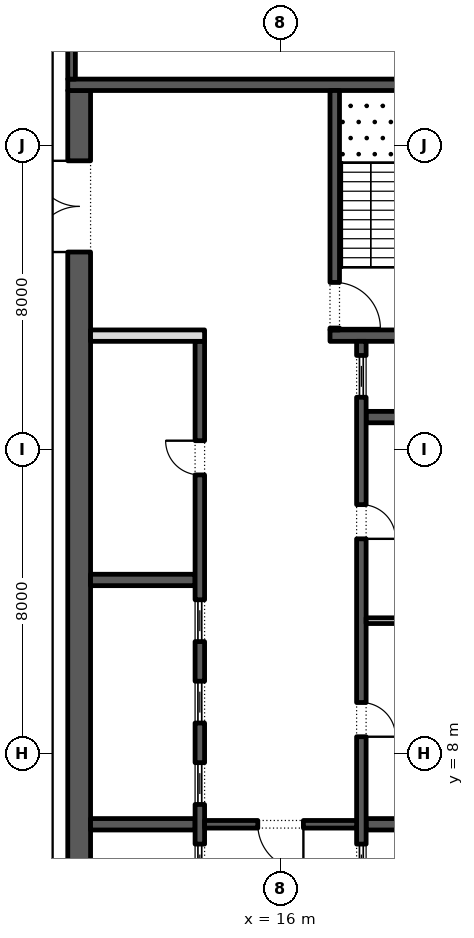
"""IFC4 building model, lengths in metres.
Left out: names, types, materials, properties, quantities, classifications, styles, units other than length and angle.
Written with IfcOpenShell. Run it as: python <this file> out.ifc"""

import sys

from ifc_helpers import new_model, si_unit, direction, frame, frame_2d, origin, place, context, subcontext, project, spatial, rectangle, extrude, element, fill, save


model = new_model("IFC4")
c1 = context("Model", 3, precision=1e-05, world=origin(), true_north=direction((0.0, 1.0)))
c2 = subcontext(c1, "Body", "Model", "MODEL_VIEW")
j1 = project(units=[si_unit("LENGTHUNIT", "METRE"), si_unit("PLANEANGLEUNIT", "RADIAN")], contexts=[c1])
p1 = place(None, origin())
s1 = spatial("IfcSite", under=j1, at=p1, CompositionType="ELEMENT")
p2 = place(p1, origin())
s2 = spatial("IfcBuilding", under=s1, at=p2, CompositionType="ELEMENT")
p3 = place(p2, frame((0.0, 0.0, 276.6)))
s3 = spatial("IfcBuildingStorey", under=s2, at=p3, CompositionType="ELEMENT", Elevation=276.6)
p4 = place(p3, frame((10.7, -2.45, 0.0), z_axis=(0.0, 0.0, 1.0), x_axis=(0.0, 1.0, 0.0)))
e1 = element("IfcWall", 1, at=p4, inside=s3, PredefinedType="SHEAR", context=c2, shape_type="SweptSolid", body=[
    extrude(rectangle(XDim=27.9, YDim=0.6, at=frame_2d((13.95, 0.0))), origin(), (0.0, 0.0, 1.0), 4.0),
])
p5 = place(p4, frame((23.65, 0.0, 0.0)))
e2 = element("IfcOpeningElement", 2, at=p5, cuts=e1, PredefinedType="OPENING", context=c2, shape_type="SweptSolid", body=[
    extrude(rectangle(XDim=2.4, YDim=2.1, at=frame_2d((1.2, 1.05))), frame((0.0, 0.31, 0.0), z_axis=(0.0, -1.0, 0.0), x_axis=(1.0, 0.0, 0.0)), (0.0, 0.0, 1.0), 0.62),
])
p6 = place(p4, frame((0.788, 0.0, 0.0)))
e3 = element("IfcOpeningElement", 3, at=p6, cuts=e1, PredefinedType="OPENING", context=c2, shape_type="SweptSolid", body=[
    extrude(rectangle(XDim=0.9, YDim=2.1, at=frame_2d((0.45, 1.05))), frame((0.0, 0.31, 0.0), z_axis=(0.0, -1.0, 0.0), x_axis=(1.0, 0.0, 0.0)), (0.0, 0.0, 1.0), 0.62),
])
p7 = place(p4, frame((3.962, 0.0, 0.0)))
e4 = element("IfcOpeningElement", 4, at=p7, cuts=e1, PredefinedType="OPENING", context=c2, shape_type="SweptSolid", body=[
    extrude(rectangle(XDim=1.0, YDim=2.1, at=frame_2d((0.5, 1.05))), frame((0.0, 0.31, 0.0), z_axis=(0.0, -1.0, 0.0), x_axis=(1.0, 0.0, 0.0)), (0.0, 0.0, 1.0), 0.62),
])
p8 = place(p3, frame((10.4, 25.6, 0.0), z_axis=(0.0, 0.0, 1.0), x_axis=(1.0, 0.0, 0.0)))
e5 = element("IfcWall", 5, at=p8, inside=s3, PredefinedType="SHEAR", context=c2, shape_type="SweptSolid", body=[
    extrude(rectangle(XDim=11.2, YDim=0.3, at=frame_2d((5.6, 0.0))), origin(), (0.0, 0.0, 1.0), 4.0),
])
p9 = place(p3, frame((17.3, 19.0, 0.0), z_axis=(0.0, 0.0, 1.0), x_axis=(1.0, 0.0, 0.0)))
e6 = element("IfcWall", 6, at=p9, inside=s3, PredefinedType="SHEAR", context=c2, shape_type="SweptSolid", body=[
    extrude(rectangle(XDim=3.7, YDim=0.3, at=frame_2d((1.85, 0.0))), origin(), (0.0, 0.0, 1.0), 4.0),
])
p10 = place(p3, frame((17.425, 19.15, 0.0), z_axis=(0.0, 0.0, 1.0), x_axis=(0.0, 1.0, 0.0)))
e7 = element("IfcWall", 7, at=p10, inside=s3, PredefinedType="SHEAR", context=c2, shape_type="SweptSolid", body=[
    extrude(rectangle(XDim=6.3, YDim=0.25, at=frame_2d((3.15, 0.0))), origin(), (0.0, 0.0, 1.0), 4.0),
])
p11 = place(p10, frame((0.05, 0.0, 0.0)))
e8 = element("IfcOpeningElement", 8, at=p11, cuts=e7, PredefinedType="OPENING", context=c2, shape_type="SweptSolid", body=[
    extrude(rectangle(XDim=1.2, YDim=2.1, at=frame_2d((0.6, 1.05))), frame((0.0, 0.135, 0.0), z_axis=(0.0, -1.0, 0.0), x_axis=(1.0, 0.0, 0.0)), (0.0, 0.0, 1.0), 0.27),
])
for number, where, z_axis, x_axis in (
    (9, (18.25, 6.143, 0.0), (0.0, 0.0, 1.0), (1.0, 0.0, 0.0)),
    (10, (18.25, 16.857, 0.0), (0.0, 0.0, 1.0), (1.0, 0.0, 0.0)),
):
    element("IfcWall", number, at=place(p3, frame(where, z_axis=z_axis, x_axis=x_axis)), inside=s3, PredefinedType="SHEAR", context=c2, shape_type="SweptSolid", body=[
        extrude(rectangle(XDim=2.75, YDim=0.3, at=frame_2d((1.375, 0.0))), origin(), (0.0, 0.0, 1.0), 4.0),
    ])
p12 = place(p3, frame((18.125, 4.15, 0.0), z_axis=(0.0, 0.0, 1.0), x_axis=(0.0, 1.0, 0.0)))
e11 = element("IfcWall", 11, at=p12, inside=s3, PredefinedType="SHEAR", context=c2, shape_type="SweptSolid", body=[
    extrude(rectangle(XDim=14.7, YDim=0.25, at=frame_2d((7.35, 0.0))), origin(), (0.0, 0.0, 1.0), 4.0),
])
p13 = place(p12, frame((4.296, 0.0, 0.0)))
e12 = element("IfcOpeningElement", 12, at=p13, cuts=e11, PredefinedType="OPENING", context=c2, shape_type="SweptSolid", body=[
    extrude(rectangle(XDim=0.9, YDim=2.1, at=frame_2d((0.45, 1.05))), frame((0.0, 0.135, 0.0), z_axis=(0.0, -1.0, 0.0), x_axis=(1.0, 0.0, 0.0)), (0.0, 0.0, 1.0), 0.27),
])
p14 = place(p12, frame((9.504, 0.0, 0.0)))
e13 = element("IfcOpeningElement", 13, at=p14, cuts=e11, PredefinedType="OPENING", context=c2, shape_type="SweptSolid", body=[
    extrude(rectangle(XDim=0.9, YDim=2.1, at=frame_2d((0.45, 1.05))), frame((0.0, 0.135, 0.0), z_axis=(0.0, -1.0, 0.0), x_axis=(1.0, 0.0, 0.0)), (0.0, 0.0, 1.0), 0.27),
])
p15 = place(p12, frame((0.371, 0.0, 0.0)))
e14 = element("IfcOpeningElement", 14, at=p15, cuts=e11, PredefinedType="OPENING", context=c2, shape_type="SweptSolid", body=[
    extrude(rectangle(XDim=1.1, YDim=2.1, at=frame_2d((0.55, 1.05))), frame((0.0, 0.135, 0.0), z_axis=(0.0, -1.0, 0.0), x_axis=(1.0, 0.0, 0.0)), (0.0, 0.0, 1.0), 0.27),
])
p16 = place(p12, frame((13.229, 0.0, 0.0)))
e15 = element("IfcOpeningElement", 15, at=p16, cuts=e11, PredefinedType="OPENING", context=c2, shape_type="SweptSolid", body=[
    extrude(rectangle(XDim=1.1, YDim=2.1, at=frame_2d((0.55, 1.05))), frame((0.0, 0.135, 0.0), z_axis=(0.0, -1.0, 0.0), x_axis=(1.0, 0.0, 0.0)), (0.0, 0.0, 1.0), 0.27),
])
p17 = place(p3, frame((18.25, 11.5, 0.0), z_axis=(0.0, 0.0, 1.0), x_axis=(1.0, 0.0, 0.0)))
e16 = element("IfcWall", 16, at=p17, inside=s3, PredefinedType="PARTITIONING", context=c2, shape_type="SweptSolid", body=[
    extrude(rectangle(XDim=2.75, YDim=0.15, at=frame_2d((1.375, 0.0))), origin(), (0.0, 0.0, 1.0), 4.0),
])
for number, where, z_axis, x_axis in (
    (17, (11.0, 6.143, 0.0), (0.0, 0.0, 1.0), (1.0, 0.0, 0.0)),
    (18, (11.0, 12.571, 0.0), (0.0, 0.0, 1.0), (1.0, 0.0, 0.0)),
):
    element("IfcWall", number, at=place(p3, frame(where, z_axis=z_axis, x_axis=x_axis)), inside=s3, PredefinedType="SHEAR", context=c2, shape_type="SweptSolid", body=[
        extrude(rectangle(XDim=2.75, YDim=0.3, at=frame_2d((1.375, 0.0))), origin(), (0.0, 0.0, 1.0), 4.0),
    ])
p18 = place(p3, frame((13.875, -2.45, 0.0), z_axis=(0.0, 0.0, 1.0), x_axis=(0.0, 1.0, 0.0)))
e19 = element("IfcWall", 19, at=p18, inside=s3, PredefinedType="SHEAR", context=c2, shape_type="SweptSolid", body=[
    extrude(rectangle(XDim=21.3, YDim=0.25, at=frame_2d((10.65, 0.0))), origin(), (0.0, 0.0, 1.0), 4.0),
])
p19 = place(p18, frame((17.786, 0.0, 0.0)))
e20 = element("IfcOpeningElement", 20, at=p19, cuts=e19, PredefinedType="OPENING", context=c2, shape_type="SweptSolid", body=[
    extrude(rectangle(XDim=0.9, YDim=2.1, at=frame_2d((0.45, 1.05))), frame((0.0, 0.135, 0.0), z_axis=(0.0, -1.0, 0.0), x_axis=(1.0, 0.0, 0.0)), (0.0, 0.0, 1.0), 0.27),
])
p20 = place(p18, frame((6.971, 0.0, 0.0)))
e21 = element("IfcOpeningElement", 21, at=p20, cuts=e19, PredefinedType="OPENING", context=c2, shape_type="SweptSolid", body=[
    extrude(rectangle(XDim=1.1, YDim=2.1, at=frame_2d((0.55, 1.05))), frame((0.0, 0.135, 0.0), z_axis=(0.0, -1.0, 0.0), x_axis=(1.0, 0.0, 0.0)), (0.0, 0.0, 1.0), 0.27),
])
p21 = place(p18, frame((9.114, 0.0, 0.0)))
e22 = element("IfcOpeningElement", 22, at=p21, cuts=e19, PredefinedType="OPENING", context=c2, shape_type="SweptSolid", body=[
    extrude(rectangle(XDim=1.1, YDim=2.1, at=frame_2d((0.55, 1.05))), frame((0.0, 0.135, 0.0), z_axis=(0.0, -1.0, 0.0), x_axis=(1.0, 0.0, 0.0)), (0.0, 0.0, 1.0), 0.27),
])
p22 = place(p18, frame((11.257, 0.0, 0.0)))
e23 = element("IfcOpeningElement", 23, at=p22, cuts=e19, PredefinedType="OPENING", context=c2, shape_type="SweptSolid", body=[
    extrude(rectangle(XDim=1.1, YDim=2.1, at=frame_2d((0.55, 1.05))), frame((0.0, 0.135, 0.0), z_axis=(0.0, -1.0, 0.0), x_axis=(1.0, 0.0, 0.0)), (0.0, 0.0, 1.0), 0.27),
])
p23 = place(p18, frame((13.4, 0.0, 0.0)))
e24 = element("IfcOpeningElement", 24, at=p23, cuts=e19, PredefinedType="OPENING", context=c2, shape_type="SweptSolid", body=[
    extrude(rectangle(XDim=1.1, YDim=2.1, at=frame_2d((0.55, 1.05))), frame((0.0, 0.135, 0.0), z_axis=(0.0, -1.0, 0.0), x_axis=(1.0, 0.0, 0.0)), (0.0, 0.0, 1.0), 0.27),
])
p24 = place(p3, frame((11.0, 19.0, 0.0), z_axis=(0.0, 0.0, 1.0), x_axis=(1.0, 0.0, 0.0)))
e25 = element("IfcWall", 25, at=p24, inside=s3, PredefinedType="PARTITIONING", context=c2, shape_type="SweptSolid", body=[
    extrude(rectangle(XDim=3.0, YDim=0.3, at=frame_2d((1.5, 0.0))), origin(), (0.0, 0.0, 1.0), 4.0),
])
p25 = place(p3, frame((14.0, 6.143, 0.0), z_axis=(0.0, 0.0, 1.0), x_axis=(1.0, 0.0, 0.0)))
e26 = element("IfcWall", 26, at=p25, inside=s3, PredefinedType="SHEAR", context=c2, shape_type="SweptSolid", body=[
    extrude(rectangle(XDim=4.0, YDim=0.2, at=frame_2d((2.0, 0.0))), origin(), (0.0, 0.0, 1.0), 4.0),
])
p26 = place(p25, frame((1.4, 0.0, 0.0)))
e27 = element("IfcOpeningElement", 27, at=p26, cuts=e26, PredefinedType="OPENING", context=c2, shape_type="SweptSolid", body=[
    extrude(rectangle(XDim=1.2, YDim=2.1, at=frame_2d((0.6, 1.05))), frame((0.0, 0.11, 0.0), z_axis=(0.0, -1.0, 0.0), x_axis=(1.0, 0.0, 0.0)), (0.0, 0.0, 1.0), 0.22),
])
p27 = place(p3, frame((10.5, 25.75, 0.0), z_axis=(0.0, 0.0, 1.0), x_axis=(0.0, 1.0, 0.0)))
e28 = element("IfcWall", 28, at=p27, inside=s3, PredefinedType="SHEAR", context=c2, shape_type="SweptSolid", body=[
    extrude(rectangle(XDim=4.75, YDim=0.2, at=frame_2d((2.375, 0.0))), origin(), (0.0, 0.0, 1.0), 4.0),
])
p28 = place(p27, frame((1.925, 0.0, 0.0)))
e29 = element("IfcOpeningElement", 29, at=p28, cuts=e28, PredefinedType="OPENING", context=c2, shape_type="SweptSolid", body=[
    extrude(rectangle(XDim=0.9, YDim=2.1, at=frame_2d((0.45, 1.05))), frame((0.0, 0.11, 0.0), z_axis=(0.0, -1.0, 0.0), x_axis=(1.0, 0.0, 0.0)), (0.0, 0.0, 1.0), 0.22),
])
p29 = place(p13, frame((0.9, -0.2, 0.0), z_axis=(0.0, 0.0, 1.0), x_axis=(-1.0, 0.0, 0.0)))
e30 = element("IfcDoor", 30, at=p29, inside=s3, OperationType="SINGLE_SWING_LEFT", PredefinedType="DOOR", context=c2, shape_type="SweptSolid", body=[
    extrude(rectangle(XDim=0.9, YDim=2.1, at=frame_2d((0.45, 1.05))), frame((0.0, -0.075, 0.0), z_axis=(0.0, -1.0, 0.0), x_axis=(1.0, 0.0, 0.0)), (0.0, 0.0, 1.0), 0.05),
])
fill(e12, e30)
p30 = place(p14, frame((0.9, -0.2, 0.0), z_axis=(0.0, 0.0, 1.0), x_axis=(-1.0, 0.0, 0.0)))
e31 = element("IfcDoor", 31, at=p30, inside=s3, OperationType="SINGLE_SWING_LEFT", PredefinedType="DOOR", context=c2, shape_type="SweptSolid", body=[
    extrude(rectangle(XDim=0.9, YDim=2.1, at=frame_2d((0.45, 1.05))), frame((0.0, -0.075, 0.0), z_axis=(0.0, -1.0, 0.0), x_axis=(1.0, 0.0, 0.0)), (0.0, 0.0, 1.0), 0.05),
])
fill(e13, e31)
p31 = place(p15, origin())
e32 = element("IfcDoor", 32, at=p31, inside=s3, OperationType="SLIDING_TO_LEFT", PredefinedType="DOOR", context=c2, shape_type="SweptSolid", body=[
    extrude(rectangle(XDim=1.1, YDim=2.1, at=frame_2d((0.55, 1.05))), frame((0.0, 0.025, 0.0), z_axis=(0.0, -1.0, 0.0), x_axis=(1.0, 0.0, 0.0)), (0.0, 0.0, 1.0), 0.05),
])
fill(e14, e32)
p32 = place(p16, origin())
e33 = element("IfcDoor", 33, at=p32, inside=s3, OperationType="SLIDING_TO_LEFT", PredefinedType="DOOR", context=c2, shape_type="SweptSolid", body=[
    extrude(rectangle(XDim=1.1, YDim=2.1, at=frame_2d((0.55, 1.05))), frame((0.0, 0.025, 0.0), z_axis=(0.0, -1.0, 0.0), x_axis=(1.0, 0.0, 0.0)), (0.0, 0.0, 1.0), 0.05),
])
fill(e15, e33)
p33 = place(p19, origin())
e34 = element("IfcDoor", 34, at=p33, inside=s3, OperationType="SINGLE_SWING_LEFT", PredefinedType="DOOR", context=c2, shape_type="SweptSolid", body=[
    extrude(rectangle(XDim=0.9, YDim=2.1, at=frame_2d((0.45, 1.05))), frame((0.0, 0.125, 0.0), z_axis=(0.0, -1.0, 0.0), x_axis=(1.0, 0.0, 0.0)), (0.0, 0.0, 1.0), 0.05),
])
fill(e20, e34)
p34 = place(p20, origin())
e35 = element("IfcDoor", 35, at=p34, inside=s3, OperationType="SLIDING_TO_LEFT", PredefinedType="DOOR", context=c2, shape_type="SweptSolid", body=[
    extrude(rectangle(XDim=1.1, YDim=2.1, at=frame_2d((0.55, 1.05))), frame((0.0, 0.025, 0.0), z_axis=(0.0, -1.0, 0.0), x_axis=(1.0, 0.0, 0.0)), (0.0, 0.0, 1.0), 0.05),
])
fill(e21, e35)
p35 = place(p21, origin())
e36 = element("IfcDoor", 36, at=p35, inside=s3, OperationType="SLIDING_TO_LEFT", PredefinedType="DOOR", context=c2, shape_type="SweptSolid", body=[
    extrude(rectangle(XDim=1.1, YDim=2.1, at=frame_2d((0.55, 1.05))), frame((0.0, 0.025, 0.0), z_axis=(0.0, -1.0, 0.0), x_axis=(1.0, 0.0, 0.0)), (0.0, 0.0, 1.0), 0.05),
])
fill(e22, e36)
p36 = place(p22, origin())
e37 = element("IfcDoor", 37, at=p36, inside=s3, OperationType="SLIDING_TO_LEFT", PredefinedType="DOOR", context=c2, shape_type="SweptSolid", body=[
    extrude(rectangle(XDim=1.1, YDim=2.1, at=frame_2d((0.55, 1.05))), frame((0.0, 0.025, 0.0), z_axis=(0.0, -1.0, 0.0), x_axis=(1.0, 0.0, 0.0)), (0.0, 0.0, 1.0), 0.05),
])
fill(e23, e37)
p37 = place(p23, origin())
e38 = element("IfcDoor", 38, at=p37, inside=s3, OperationType="SLIDING_TO_LEFT", PredefinedType="DOOR", context=c2, shape_type="SweptSolid", body=[
    extrude(rectangle(XDim=1.1, YDim=2.1, at=frame_2d((0.55, 1.05))), frame((0.0, 0.025, 0.0), z_axis=(0.0, -1.0, 0.0), x_axis=(1.0, 0.0, 0.0)), (0.0, 0.0, 1.0), 0.05),
])
fill(e24, e38)
p38 = place(p26, frame((1.2, 0.0, 0.0), z_axis=(0.0, 0.0, 1.0), x_axis=(-1.0, 0.0, 0.0)))
e39 = element("IfcDoor", 39, at=p38, inside=s3, OperationType="SINGLE_SWING_RIGHT", PredefinedType="DOOR", context=c2, shape_type="SweptSolid", body=[
    extrude(rectangle(XDim=1.2, YDim=2.1, at=frame_2d((0.6, 1.05))), frame((0.0, 0.025, 0.0), z_axis=(0.0, -1.0, 0.0), x_axis=(1.0, 0.0, 0.0)), (0.0, 0.0, 1.0), 0.05),
])
fill(e27, e39)
p39 = place(p5, origin())
e40 = element("IfcDoor", 40, at=p39, inside=s3, OperationType="DOUBLE_DOOR_SINGLE_SWING", PredefinedType="DOOR", context=c2, shape_type="SweptSolid", body=[
    extrude(rectangle(XDim=2.4, YDim=2.1, at=frame_2d((1.2, 1.05))), frame((0.0, 0.025, 0.0), z_axis=(0.0, -1.0, 0.0), x_axis=(1.0, 0.0, 0.0)), (0.0, 0.0, 1.0), 0.05),
])
fill(e2, e40)
p40 = place(p11, frame((1.2, 0.0, 0.0), z_axis=(0.0, 0.0, 1.0), x_axis=(-1.0, 0.0, 0.0)))
e41 = element("IfcDoor", 41, at=p40, inside=s3, OperationType="SINGLE_SWING_LEFT", PredefinedType="DOOR", context=c2, shape_type="SweptSolid", body=[
    extrude(rectangle(XDim=1.2, YDim=2.1, at=frame_2d((0.6, 1.05))), frame((0.0, 0.025, 0.0), z_axis=(0.0, -1.0, 0.0), x_axis=(1.0, 0.0, 0.0)), (0.0, 0.0, 1.0), 0.05),
])
fill(e8, e41)
save(model, sys.argv[1])
